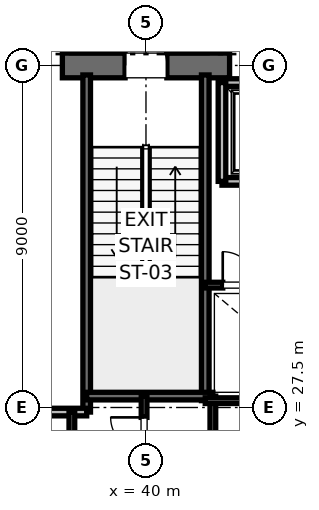
"""IFC4 building model, lengths in metres.
Left out: names, types, materials, properties, quantities, classifications, styles, units other than length and angle.
Written with IfcOpenShell. Run it as: python <this file> out.ifc"""

import sys

from ifc_helpers import new_model, si_unit, direction, frame, frame_2d, origin, place, context, subcontext, project, spatial, rectangle, extrude, element, fill, save


model = new_model("IFC4")
c1 = context("Model", 3, precision=1e-05, world=origin(), true_north=direction((0.0, 1.0)))
c2 = subcontext(c1, "Body", "Model", "MODEL_VIEW")
j1 = project(units=[si_unit("LENGTHUNIT", "METRE"), si_unit("PLANEANGLEUNIT", "RADIAN")], contexts=[c1])
p1 = place(None, origin())
s1 = spatial("IfcSite", under=j1, at=p1, CompositionType="ELEMENT")
p2 = place(p1, origin())
s2 = spatial("IfcBuilding", under=s1, at=p2, CompositionType="ELEMENT")
p3 = place(p2, frame((0.0, 0.0, -4.5)))
s3 = spatial("IfcBuildingStorey", under=s2, at=p3, CompositionType="ELEMENT", Elevation=-4.5)
p4 = place(p3, frame((37.8, 36.5, 0.0), z_axis=(0.0, 0.0, 1.0), x_axis=(1.0, 0.0, 0.0)))
e1 = element("IfcWall", 1, at=p4, inside=s3, PredefinedType="SHEAR", context=c2, shape_type="SweptSolid", body=[
    extrude(rectangle(XDim=4.4, YDim=0.65, at=frame_2d((2.2, 0.0))), origin(), (0.0, 0.0, 1.0), 4.22),
])
p5 = place(p4, frame((1.65, 0.0, 0.0)))
e2 = element("IfcOpeningElement", 2, at=p5, cuts=e1, PredefinedType="OPENING", context=c2, shape_type="SweptSolid", body=[
    extrude(rectangle(XDim=1.1, YDim=2.15, at=frame_2d((0.55, 1.075))), frame((0.0, 0.325, 0.0), z_axis=(0.0, -1.0, 0.0), x_axis=(1.0, 0.0, 0.0)), (0.0, 0.0, 1.0), 0.65),
])
p6 = place(p3, frame((38.44, 27.38, 0.0), z_axis=(0.0, 0.0, 1.0), x_axis=(0.0, 1.0, 0.0)))
e3 = element("IfcWall", 3, at=p6, inside=s3, PredefinedType="SOLIDWALL", context=c2, shape_type="SweptSolid", body=[
    extrude(rectangle(XDim=8.87, YDim=0.2, at=frame_2d((4.435, 0.0))), origin(), (0.0, 0.0, 1.0), 4.22),
])
p7 = place(p3, frame((41.56, 27.68, 0.0), z_axis=(0.0, 0.0, 1.0), x_axis=(0.0, 1.0, 0.0)))
e4 = element("IfcWall", 4, at=p7, inside=s3, PredefinedType="SOLIDWALL", context=c2, shape_type="SweptSolid", body=[
    extrude(rectangle(XDim=8.57, YDim=0.2, at=frame_2d((4.285, 0.0))), origin(), (0.0, 0.0, 1.0), 4.22),
])
p8 = place(p3, frame((38.44, 27.8, 0.0), z_axis=(0.0, 0.0, 1.0), x_axis=(1.0, 0.0, 0.0)))
e5 = element("IfcWall", 5, at=p8, inside=s3, PredefinedType="SOLIDWALL", context=c2, shape_type="SweptSolid", body=[
    extrude(rectangle(XDim=3.32, YDim=0.2, at=frame_2d((1.66, 0.0))), origin(), (0.0, 0.0, 1.0), 4.22),
])
p9 = place(p3, frame((32.82, 27.38, 0.0), z_axis=(0.0, 0.0, 1.0), x_axis=(1.0, 0.0, 0.0)))
e6 = element("IfcWall", 6, at=p9, inside=s3, PredefinedType="PARTITIONING", context=c2, shape_type="SweptSolid", body=[
    extrude(rectangle(XDim=5.62, YDim=0.2, at=frame_2d((2.81, 0.0))), origin(), (0.0, 0.0, 1.0), 4.22),
])
p10 = place(p3, frame((42.0, 33.45, 0.0), z_axis=(0.0, 0.0, 1.0), x_axis=(1.0, 0.0, 0.0)))
e7 = element("IfcWall", 7, at=p10, inside=s3, PredefinedType="SOLIDWALL", context=c2, shape_type="SweptSolid", body=[
    extrude(rectangle(XDim=2.3, YDim=0.2, at=frame_2d((1.15, 0.0))), origin(), (0.0, 0.0, 1.0), 4.22),
])
p11 = place(p10, frame((0.6, 0.0, 0.0)))
e8 = element("IfcOpeningElement", 8, at=p11, cuts=e7, PredefinedType="OPENING", context=c2, shape_type="SweptSolid", body=[
    extrude(rectangle(XDim=1.1, YDim=2.2, at=frame_2d((0.55, 1.1))), frame((0.0, 0.1, 0.0), z_axis=(0.0, -1.0, 0.0), x_axis=(1.0, 0.0, 0.0)), (0.0, 0.0, 1.0), 0.2),
])
p12 = place(p3, frame((44.3, 36.05, 0.0), z_axis=(0.0, 0.0, 1.0), x_axis=(-1.0, 0.0, 0.0)))
e9 = element("IfcWall", 9, at=p12, inside=s3, PredefinedType="SOLIDWALL", context=c2, shape_type="SweptSolid", body=[
    extrude(rectangle(XDim=2.3, YDim=0.2, at=frame_2d((1.15, 0.0))), origin(), (0.0, 0.0, 1.0), 3.0),
])
p13 = place(p3, frame((42.0, 36.05, 0.0), z_axis=(0.0, 0.0, 1.0), x_axis=(0.0, -1.0, 0.0)))
e10 = element("IfcWall", 10, at=p13, inside=s3, PredefinedType="SOLIDWALL", context=c2, shape_type="SweptSolid", body=[
    extrude(rectangle(XDim=2.6, YDim=0.2, at=frame_2d((1.3, 0.0))), origin(), (0.0, 0.0, 1.0), 3.0),
])
p14 = place(p3, frame((41.76, 23.8, 0.0), z_axis=(0.0, 0.0, 1.0), x_axis=(0.0, 1.0, 0.0)))
e11 = element("IfcWall", 11, at=p14, inside=s3, PredefinedType="PARTITIONING", context=c2, shape_type="SweptSolid", body=[
    extrude(rectangle(XDim=4.0, YDim=0.15, at=frame_2d((2.0, 0.0))), origin(), (0.0, 0.0, 1.0), 2.85),
])
p15 = place(p3, frame((39.95, 25.8, 0.0), z_axis=(0.0, 0.0, 1.0), x_axis=(0.0, 1.0, 0.0)))
e12 = element("IfcWall", 12, at=p15, inside=s3, PredefinedType="PARTITIONING", context=c2, shape_type="SweptSolid", body=[
    extrude(rectangle(XDim=2.0, YDim=0.15, at=frame_2d((1.0, 0.0))), origin(), (0.0, 0.0, 1.0), 2.85),
])
p16 = place(p15, frame((0.56, 0.0, 0.0)))
e13 = element("IfcOpeningElement", 13, at=p16, cuts=e12, PredefinedType="OPENING", context=c2, shape_type="SweptSolid", body=[
    extrude(rectangle(XDim=0.88, YDim=2.1, at=frame_2d((0.44, 1.05))), frame((0.0, 0.075, 0.0), z_axis=(0.0, -1.0, 0.0), x_axis=(1.0, 0.0, 0.0)), (0.0, 0.0, 1.0), 0.15),
])
p17 = place(p3, frame((38.05, 23.06, 0.0), z_axis=(0.0, 0.0, 1.0), x_axis=(0.0, 1.0, 0.0)))
e14 = element("IfcWall", 14, at=p17, inside=s3, PredefinedType="PARTITIONING", context=c2, shape_type="SweptSolid", body=[
    extrude(rectangle(XDim=4.32, YDim=0.15, at=frame_2d((2.16, 0.0))), origin(), (0.0, 0.0, 1.0), 2.85),
])
p18 = place(p17, frame((1.72, 0.0, 0.0)))
e15 = element("IfcOpeningElement", 15, at=p18, cuts=e14, PredefinedType="OPENING", context=c2, shape_type="SweptSolid", body=[
    extrude(rectangle(XDim=0.88, YDim=2.1, at=frame_2d((0.44, 1.05))), frame((0.0, 0.075, 0.0), z_axis=(0.0, -1.0, 0.0), x_axis=(1.0, 0.0, 0.0)), (0.0, 0.0, 1.0), 0.15),
])
p19 = place(p3, frame((41.56, 27.68, 0.0), z_axis=(0.0, 0.0, 1.0), x_axis=(1.0, 0.0, 0.0)))
e16 = element("IfcWall", 16, at=p19, inside=s3, PredefinedType="PARTITIONING", context=c2, shape_type="SweptSolid", body=[
    extrude(rectangle(XDim=3.59, YDim=0.15, at=frame_2d((1.795, 0.0))), origin(), (0.0, 0.0, 1.0), 2.85),
])
p20 = place(p3, frame((41.56, 30.72, 0.0), z_axis=(0.0, 0.0, 1.0), x_axis=(1.0, 0.0, 0.0)))
e17 = element("IfcWall", 17, at=p20, inside=s3, PredefinedType="PARTITIONING", context=c2, shape_type="SweptSolid", body=[
    extrude(rectangle(XDim=1.8, YDim=0.15, at=frame_2d((0.9, 0.0))), origin(), (0.0, 0.0, 1.0), 2.85),
])
p21 = place(p20, frame((0.46, 0.0, 0.0)))
e18 = element("IfcOpeningElement", 18, at=p21, cuts=e17, PredefinedType="OPENING", context=c2, shape_type="SweptSolid", body=[
    extrude(rectangle(XDim=0.88, YDim=2.1, at=frame_2d((0.44, 1.05))), frame((0.0, 0.075, 0.0), z_axis=(0.0, -1.0, 0.0), x_axis=(1.0, 0.0, 0.0)), (0.0, 0.0, 1.0), 0.15),
])
p22 = place(p5, origin())
e19 = element("IfcDoor", 19, at=p22, inside=s3, OperationType="SINGLE_SWING_LEFT", PredefinedType="DOOR", context=c2, shape_type="SweptSolid", body=[
    extrude(rectangle(XDim=1.1, YDim=2.15, at=frame_2d((0.55, 1.075))), frame((0.0, 0.025, 0.0), z_axis=(0.0, -1.0, 0.0), x_axis=(1.0, 0.0, 0.0)), (0.0, 0.0, 1.0), 0.05),
])
fill(e2, e19)
p23 = place(p16, origin())
e20 = element("IfcDoor", 20, at=p23, inside=s3, OperationType="SINGLE_SWING_RIGHT", PredefinedType="DOOR", context=c2, shape_type="SweptSolid", body=[
    extrude(rectangle(XDim=0.88, YDim=2.1, at=frame_2d((0.44, 1.05))), frame((0.0, 0.025, 0.0), z_axis=(0.0, -1.0, 0.0), x_axis=(1.0, 0.0, 0.0)), (0.0, 0.0, 1.0), 0.05),
])
fill(e13, e20)
p24 = place(p21, origin())
e21 = element("IfcDoor", 21, at=p24, inside=s3, OperationType="SINGLE_SWING_LEFT", PredefinedType="DOOR", context=c2, shape_type="SweptSolid", body=[
    extrude(rectangle(XDim=0.88, YDim=2.1, at=frame_2d((0.44, 1.05))), frame((0.0, 0.025, 0.0), z_axis=(0.0, -1.0, 0.0), x_axis=(1.0, 0.0, 0.0)), (0.0, 0.0, 1.0), 0.05),
])
fill(e18, e21)
save(model, sys.argv[1])
